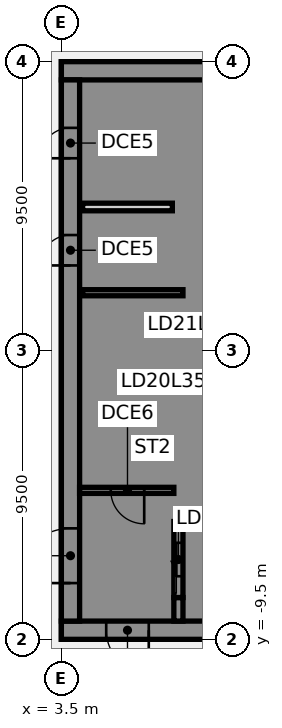
"""IFC4 building model, lengths in metres.
Left out: names, types, materials, properties, quantities, classifications, styles, units other than length and angle.
Written with IfcOpenShell. Run it as: python <this file> out.ifc"""

import sys

from ifc_helpers import new_model, si_unit, direction, frame, frame_2d, origin, place, context, subcontext, project, spatial, polyline, rectangle, outline, extrude, element, fill, save


model = new_model("IFC4")
c1 = context("Model", 3, precision=1e-05, world=origin(), true_north=direction((0.0, 1.0)))
c2 = subcontext(c1, "Body", "Model", "MODEL_VIEW")
j1 = project(units=[si_unit("LENGTHUNIT", "METRE"), si_unit("PLANEANGLEUNIT", "RADIAN")], contexts=[c1])
p1 = place(None, origin())
s1 = spatial("IfcSite", under=j1, at=p1, CompositionType="ELEMENT")
p2 = place(p1, origin())
s2 = spatial("IfcBuilding", under=s1, at=p2, CompositionType="ELEMENT")
p3 = place(p2, frame((0.0, 0.0, 144.25)))
s3 = spatial("IfcBuildingStorey", under=s2, at=p3, CompositionType="ELEMENT", Elevation=144.25)
p4 = place(p3, frame((16.5, -9.2, 0.0), z_axis=(0.0, 0.0, 1.0), x_axis=(-1.0, 0.0, 0.0)))
e1 = element("IfcWall", 1, at=p4, inside=s3, PredefinedType="SHEAR", context=c2, shape_type="SweptSolid", body=[
    extrude(rectangle(XDim=13.0, YDim=0.6, at=frame_2d((6.5, 0.0))), origin(), (0.0, 0.0, 1.0), 3.61),
])
p5 = place(p4, frame((4.15, 0.0, 0.0)))
e2 = element("IfcOpeningElement", 2, at=p5, cuts=e1, PredefinedType="OPENING", context=c2, shape_type="SweptSolid", body=[
    extrude(rectangle(XDim=1.4, YDim=2.1, at=frame_2d((0.7, 1.05))), frame((0.0, 0.31, 0.0), z_axis=(0.0, -1.0, 0.0), x_axis=(1.0, 0.0, 0.0)), (0.0, 0.0, 1.0), 0.62),
])
p6 = place(p4, frame((10.125, 0.0, 0.0)))
e3 = element("IfcOpeningElement", 3, at=p6, cuts=e1, PredefinedType="OPENING", context=c2, shape_type="SweptSolid", body=[
    extrude(rectangle(XDim=1.4, YDim=2.1, at=frame_2d((0.7, 1.05))), frame((0.0, 0.31, 0.0), z_axis=(0.0, -1.0, 0.0), x_axis=(1.0, 0.0, 0.0)), (0.0, 0.0, 1.0), 0.62),
])
p7 = place(p3, frame((16.5, 9.2, 0.0), z_axis=(0.0, 0.0, 1.0), x_axis=(-1.0, 0.0, 0.0)))
e4 = element("IfcWall", 4, at=p7, inside=s3, PredefinedType="SHEAR", context=c2, shape_type="SweptSolid", body=[
    extrude(rectangle(XDim=13.0, YDim=0.6, at=frame_2d((6.5, 0.0))), origin(), (0.0, 0.0, 1.0), 3.61),
])
p8 = place(p3, origin())
e5 = element("IfcWall", 5, at=p8, inside=s3, PredefinedType="SHEAR", context=c2, shape_type="SweptSolid", body=[
    extrude(outline(polyline([(9.8, -5.375), (7.5, -5.375), (7.5, -2.875), (9.8, -2.875), (9.8, -2.625), (7.5, -2.625), (7.5, -0.125), (9.8, -0.125), (9.8, 0.125), (7.5, 0.125), (7.5, 2.625), (9.8, 2.625), (9.8, 2.875), (7.5, 2.875), (7.5, 5.375), (9.8, 5.375), (9.8, 5.625), (7.5, 5.625), (7.5, 8.125), (9.8, 8.125), (9.8, 8.9), (7.5, 8.9), (7.2, 8.9), (7.2, -5.625), (7.5, -5.625), (9.8, -5.625), (9.8, -5.375)])), origin(), (0.0, 0.0, 1.0), 3.61),
])
p9 = place(p3, origin())
e6 = element("IfcWall", 6, at=p9, inside=s3, PredefinedType="SHEAR", context=c2, shape_type="SweptSolid", body=[
    extrude(outline(polyline([(7.5, -8.125), (7.5, -8.9), (9.8, -8.9), (9.8, -8.125), (9.8, -5.625), (9.55, -5.625), (9.55, -8.125), (7.5, -8.125)])), origin(), (0.0, 0.0, 1.0), 3.61),
])
p10 = place(p3, frame((7.35, -8.9, 0.0), z_axis=(0.0, 0.0, 1.0), x_axis=(0.0, 1.0, 0.0)))
e7 = element("IfcWall", 7, at=p10, inside=s3, PredefinedType="SHEAR", context=c2, shape_type="SweptSolid", body=[
    extrude(rectangle(XDim=0.775, YDim=0.3, at=frame_2d((0.387, 0.0))), origin(), (0.0, 0.0, 1.0), 3.61),
])
p11 = place(p3, frame((7.5, 1.9, 0.0), z_axis=(0.0, 0.0, 1.0), x_axis=(-1.0, 0.0, 0.0)))
e8 = element("IfcWall", 8, at=p11, inside=s3, PredefinedType="SHEAR", context=c2, shape_type="SweptSolid", body=[
    extrude(rectangle(XDim=3.3, YDim=0.2, at=frame_2d((1.65, 0.0))), origin(), (0.0, 0.0, 1.0), 3.61),
])
p12 = place(p3, frame((7.35, -8.125, 0.0), z_axis=(0.0, 0.0, 1.0), x_axis=(0.0, 1.0, 0.0)))
e9 = element("IfcWall", 9, at=p12, inside=s3, PredefinedType="SHEAR", context=c2, shape_type="SweptSolid", body=[
    extrude(rectangle(XDim=2.5, YDim=0.3, at=frame_2d((1.25, 0.0))), origin(), (0.0, 0.0, 1.0), 3.61),
])
p13 = place(p12, frame((0.7, 0.0, 0.0)))
e10 = element("IfcOpeningElement", 10, at=p13, cuts=e9, PredefinedType="OPENING", context=c2, shape_type="SweptSolid", body=[
    extrude(rectangle(XDim=1.1, YDim=2.1, at=frame_2d((0.55, 1.05))), frame((0.0, 0.16, 0.0), z_axis=(0.0, -1.0, 0.0), x_axis=(1.0, 0.0, 0.0)), (0.0, 0.0, 1.0), 0.32),
])
p14 = place(p3, frame((3.8, -8.9, 0.0), z_axis=(0.0, 0.0, 1.0), x_axis=(0.0, 1.0, 0.0)))
e11 = element("IfcWall", 11, at=p14, inside=s3, PredefinedType="SHEAR", context=c2, shape_type="SweptSolid", body=[
    extrude(rectangle(XDim=17.8, YDim=0.6, at=frame_2d((8.9, 0.0))), origin(), (0.0, 0.0, 1.0), 3.61),
])
p15 = place(p14, frame((1.25, 0.0, 0.0)))
e12 = element("IfcOpeningElement", 12, at=p15, cuts=e11, PredefinedType="OPENING", context=c2, shape_type="SweptSolid", body=[
    extrude(rectangle(XDim=1.8, YDim=2.1, at=frame_2d((0.9, 1.05))), frame((0.0, 0.31, 0.0), z_axis=(0.0, -1.0, 0.0), x_axis=(1.0, 0.0, 0.0)), (0.0, 0.0, 1.0), 0.62),
])
p16 = place(p14, frame((11.698, 0.0, 0.0)))
e13 = element("IfcOpeningElement", 13, at=p16, cuts=e11, PredefinedType="OPENING", context=c2, shape_type="SweptSolid", body=[
    extrude(rectangle(XDim=1.0, YDim=2.1, at=frame_2d((0.5, 1.05))), frame((0.0, 0.31, 0.0), z_axis=(0.0, -1.0, 0.0), x_axis=(1.0, 0.0, 0.0)), (0.0, 0.0, 1.0), 0.62),
])
p17 = place(p14, frame((15.222, 0.0, 0.0)))
e14 = element("IfcOpeningElement", 14, at=p17, cuts=e11, PredefinedType="OPENING", context=c2, shape_type="SweptSolid", body=[
    extrude(rectangle(XDim=1.0, YDim=2.1, at=frame_2d((0.5, 1.05))), frame((0.0, 0.31, 0.0), z_axis=(0.0, -1.0, 0.0), x_axis=(1.0, 0.0, 0.0)), (0.0, 0.0, 1.0), 0.62),
])
p18 = place(p3, frame((7.15, 4.72, 0.0), z_axis=(0.0, 0.0, 1.0), x_axis=(-1.0, 0.0, 0.0)))
e15 = element("IfcWall", 15, at=p18, inside=s3, PredefinedType="PARTITIONING", context=c2, shape_type="SweptSolid", body=[
    extrude(rectangle(XDim=2.95, YDim=0.25, at=frame_2d((1.475, 0.0))), origin(), (0.0, 0.0, 1.0), 3.61),
])
p19 = place(p3, frame((7.2, -4.6, 0.0), z_axis=(0.0, 0.0, 1.0), x_axis=(-1.0, 0.0, 0.0)))
e16 = element("IfcWall", 16, at=p19, inside=s3, PredefinedType="SHEAR", context=c2, shape_type="SweptSolid", body=[
    extrude(rectangle(XDim=3.1, YDim=0.2, at=frame_2d((1.55, 0.0))), origin(), (0.0, 0.0, 1.0), 3.61),
])
p20 = place(p19, frame((0.975, 0.0, 0.0)))
e17 = element("IfcOpeningElement", 17, at=p20, cuts=e16, PredefinedType="OPENING", context=c2, shape_type="SweptSolid", body=[
    extrude(rectangle(XDim=1.1, YDim=2.1, at=frame_2d((0.55, 1.05))), frame((0.0, 0.11, 0.0), z_axis=(0.0, -1.0, 0.0), x_axis=(1.0, 0.0, 0.0)), (0.0, 0.0, 1.0), 0.22),
])
p21 = place(p6, origin())
e18 = element("IfcDoor", 18, at=p21, inside=s3, OperationType="SINGLE_SWING_LEFT", PredefinedType="DOOR", context=c2, shape_type="SweptSolid", body=[
    extrude(rectangle(XDim=1.4, YDim=2.1, at=frame_2d((0.7, 1.05))), frame((0.0, 0.025, 0.0), z_axis=(0.0, -1.0, 0.0), x_axis=(1.0, 0.0, 0.0)), (0.0, 0.0, 1.0), 0.05),
])
fill(e3, e18)
p22 = place(p15, origin())
e19 = element("IfcDoor", 19, at=p22, inside=s3, OperationType="SINGLE_SWING_LEFT", PredefinedType="DOOR", context=c2, shape_type="SweptSolid", body=[
    extrude(rectangle(XDim=1.8, YDim=2.1, at=frame_2d((0.9, 1.05))), frame((0.0, 0.025, 0.0), z_axis=(0.0, -1.0, 0.0), x_axis=(1.0, 0.0, 0.0)), (0.0, 0.0, 1.0), 0.05),
])
fill(e12, e19)
p23 = place(p16, origin())
e20 = element("IfcDoor", 20, at=p23, inside=s3, OperationType="SINGLE_SWING_LEFT", PredefinedType="DOOR", context=c2, shape_type="SweptSolid", body=[
    extrude(rectangle(XDim=1.0, YDim=2.1, at=frame_2d((0.5, 1.05))), frame((0.0, -0.225, 0.0), z_axis=(0.0, -1.0, 0.0), x_axis=(1.0, 0.0, 0.0)), (0.0, 0.0, 1.0), 0.05),
])
fill(e13, e20)
p24 = place(p17, origin())
e21 = element("IfcDoor", 21, at=p24, inside=s3, OperationType="SINGLE_SWING_LEFT", PredefinedType="DOOR", context=c2, shape_type="SweptSolid", body=[
    extrude(rectangle(XDim=1.0, YDim=2.1, at=frame_2d((0.5, 1.05))), frame((0.0, -0.225, 0.0), z_axis=(0.0, -1.0, 0.0), x_axis=(1.0, 0.0, 0.0)), (0.0, 0.0, 1.0), 0.05),
])
fill(e14, e21)
p25 = place(p20, origin())
e22 = element("IfcDoor", 22, at=p25, inside=s3, OperationType="SINGLE_SWING_LEFT", PredefinedType="DOOR", context=c2, shape_type="SweptSolid", body=[
    extrude(rectangle(XDim=1.1, YDim=2.1, at=frame_2d((0.55, 1.05))), frame((0.0, 0.025, 0.0), z_axis=(0.0, -1.0, 0.0), x_axis=(1.0, 0.0, 0.0)), (0.0, 0.0, 1.0), 0.05),
])
fill(e17, e22)
p26 = place(p13, origin())
e23 = element("IfcDoor", 23, at=p26, inside=s3, OperationType="SLIDING_TO_LEFT", PredefinedType="DOOR", context=c2, shape_type="SweptSolid", body=[
    extrude(rectangle(XDim=1.1, YDim=2.1, at=frame_2d((0.55, 1.05))), frame((0.0, 0.025, 0.0), z_axis=(0.0, -1.0, 0.0), x_axis=(1.0, 0.0, 0.0)), (0.0, 0.0, 1.0), 0.05),
])
fill(e10, e23)
save(model, sys.argv[1])
